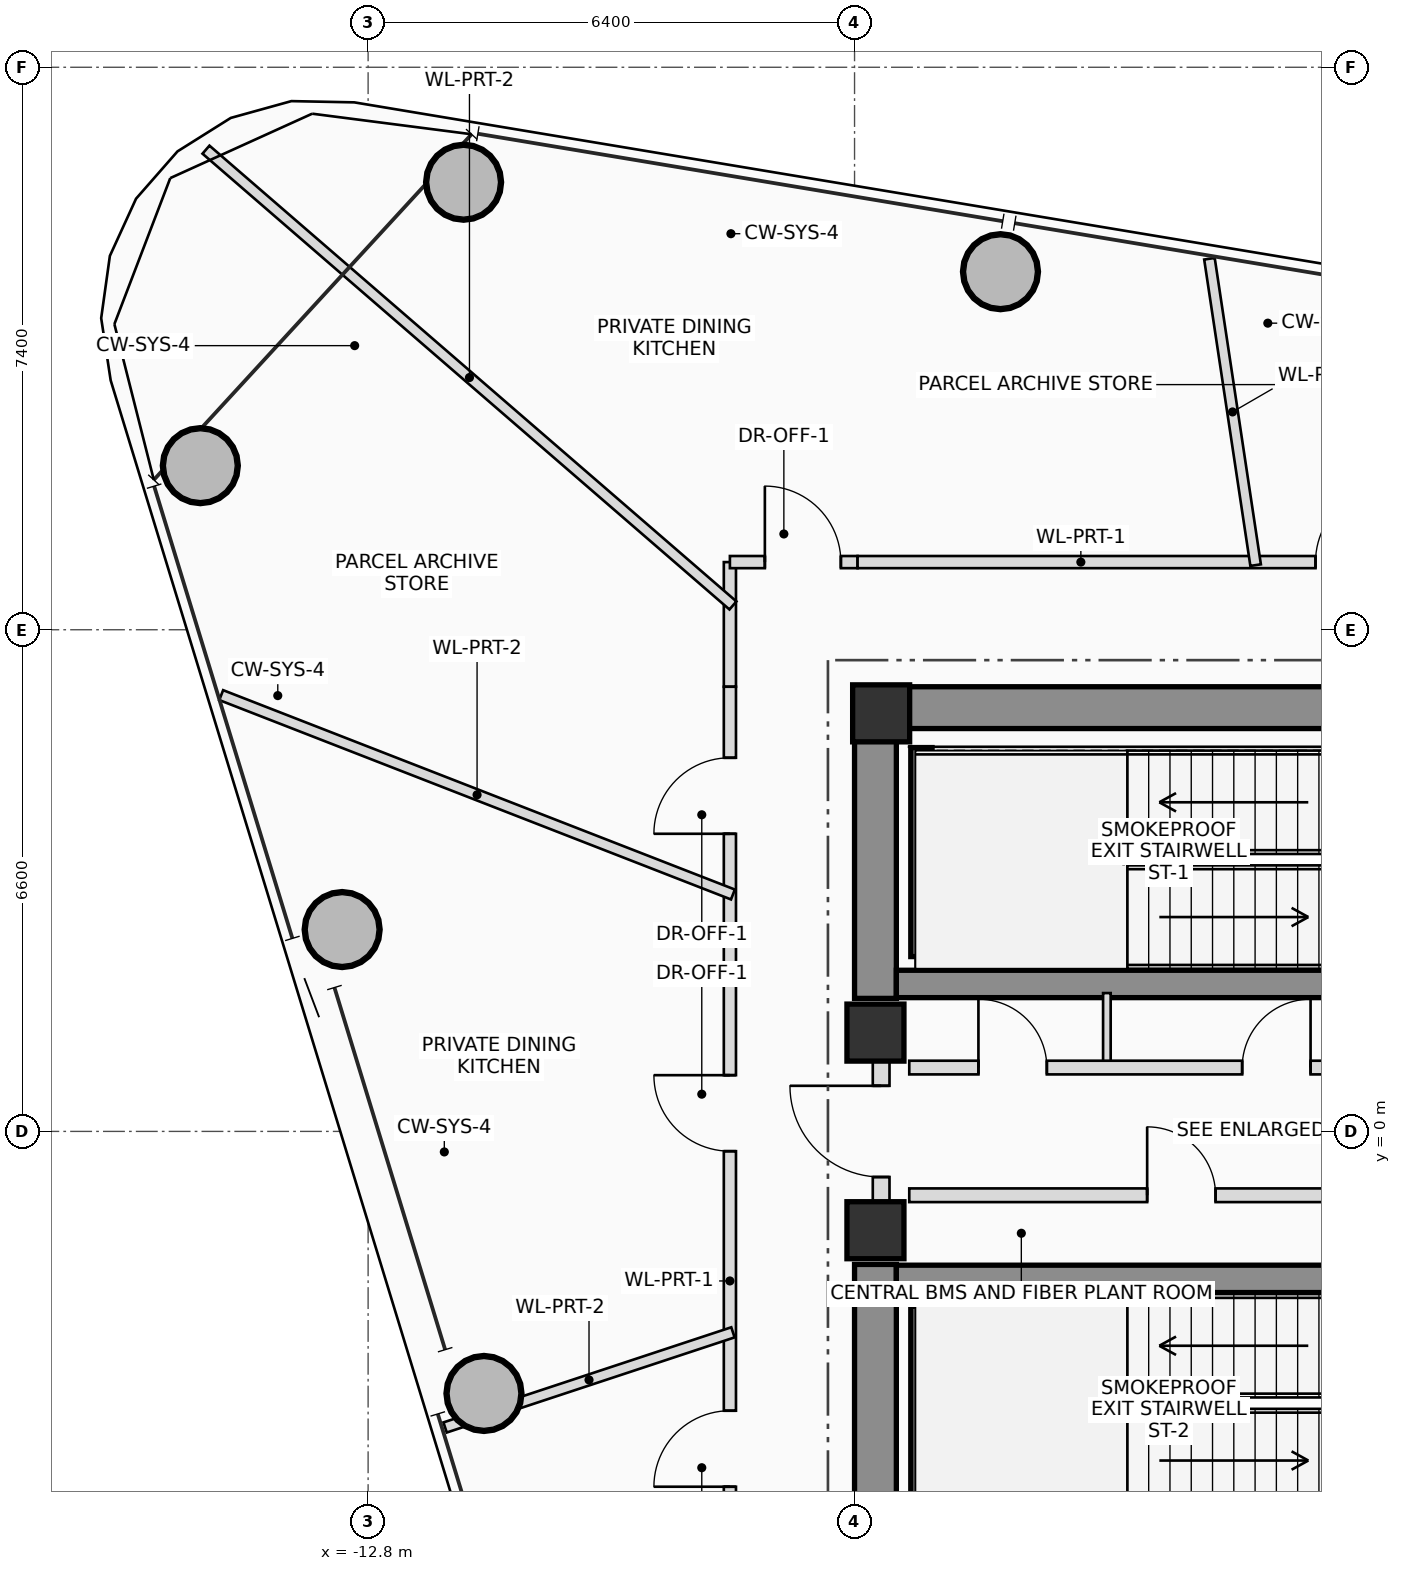
"""IFC4 building model, lengths in metres.
Left out: names, types, materials, properties, quantities, classifications, styles, units other than length and angle.
Written with IfcOpenShell. Run it as: python <this file> out.ifc"""

import sys

from ifc_helpers import new_model, si_unit, direction, frame, frame_2d, origin, origin_2d, place, context, subcontext, project, spatial, rectangle, hollow_circle, extrude, source, transform, mapped, element, fill, save


model = new_model("IFC4")
c1 = context("Model", 3, precision=1e-05, world=origin(), true_north=direction((0.0, 1.0)))
c2 = subcontext(c1, "Body", "Model", "MODEL_VIEW")
j1 = project(units=[si_unit("LENGTHUNIT", "METRE"), si_unit("PLANEANGLEUNIT", "RADIAN")], contexts=[c1])
p1 = place(None, origin())
s1 = spatial("IfcSite", under=j1, at=p1, CompositionType="ELEMENT")
p2 = place(p1, origin())
s2 = spatial("IfcBuilding", under=s1, at=p2, CompositionType="ELEMENT")
p3 = place(p2, frame((0.0, 0.0, 238.85)))
s3 = spatial("IfcBuildingStorey", under=s2, at=p3, CompositionType="ELEMENT", Elevation=238.85)
m1 = source(origin(), c2, "Body", "SweptSolid", [
    extrude(rectangle(XDim=0.75, YDim=0.75, at=origin_2d()), origin(), (0.0, 0.0, 1.0), 3.4),
])
p4 = place(p3, frame((-6.05, 5.5, 0.0), z_axis=(0.0, 0.0, 1.0), x_axis=(1.0, 0.0, 0.0)))
e1 = element("IfcColumn", 1, at=p4, inside=s3, PredefinedType="COLUMN", context=c2, shape_type="MappedRepresentation", body=[
    mapped(m1, transform((0.0, 0.0, 0.0), scale=1.0)),
])
p5 = place(p3, frame((-6.4, 5.575, 0.0), z_axis=(0.0, 0.0, 1.0), x_axis=(1.0, 0.0, 0.0)))
e2 = element("IfcWall", 2, at=p5, inside=s3, PredefinedType="SHEAR", context=c2, shape_type="SweptSolid", body=[
    extrude(rectangle(XDim=12.8, YDim=0.55, at=frame_2d((6.4, 0.0))), origin(), (0.0, 0.0, 1.0), 3.4),
])
p6 = place(p5, frame((8.6, 0.0, 0.0)))
e3 = element("IfcOpeningElement", 3, at=p6, cuts=e2, PredefinedType="OPENING", context=c2, shape_type="SweptSolid", body=[
    extrude(rectangle(XDim=1.2, YDim=2.2, at=frame_2d((0.6, 1.1))), frame((0.0, 0.285, 0.0), z_axis=(0.0, -1.0, 0.0), x_axis=(1.0, 0.0, 0.0)), (0.0, 0.0, 1.0), 0.57),
])
for number, where, z_axis, x_axis in (
    (4, (-6.125, -5.3, 0.0), (0.0, 0.0, 1.0), (0.0, 1.0, 0.0)),
    (5, (-6.125, 1.75, 0.0), (0.0, 0.0, 1.0), (0.0, 1.0, 0.0)),
):
    element("IfcWall", number, at=place(p3, frame(where, z_axis=z_axis, x_axis=x_axis)), inside=s3, PredefinedType="SHEAR", context=c2, shape_type="SweptSolid", body=[
        extrude(rectangle(XDim=3.55, YDim=0.55, at=frame_2d((1.775, 0.0))), origin(), (0.0, 0.0, 1.0), 3.4),
    ])
for number, where, z_axis, x_axis in (
    (6, (-5.85, 1.94, 0.0), (0.0, 0.0, 1.0), (1.0, 0.0, 0.0)),
    (7, (-5.85, -1.94, 0.0), (0.0, 0.0, 1.0), (1.0, 0.0, 0.0)),
):
    element("IfcWall", number, at=place(p3, frame(where, z_axis=z_axis, x_axis=x_axis)), inside=s3, PredefinedType="SHEAR", context=c2, shape_type="SweptSolid", body=[
        extrude(rectangle(XDim=11.7, YDim=0.36, at=frame_2d((5.85, 0.0))), origin(), (0.0, 0.0, 1.0), 3.4),
    ])
for number, where, z_axis, x_axis in (
    (8, (-5.52, 2.3, 0.0), (0.0, 0.0, 1.0), (0.0, 1.0, 0.0)),
    (9, (-5.52, -5.05, 0.0), (0.0, 0.0, 1.0), (0.0, 1.0, 0.0)),
):
    element("IfcWall", number, at=place(p3, frame(where, z_axis=z_axis, x_axis=x_axis)), inside=s3, PredefinedType="SHEAR", context=c2, shape_type="SweptSolid", body=[
        extrude(rectangle(XDim=2.75, YDim=0.28, at=frame_2d((1.375, 0.0))), origin(), (0.0, 0.0, 1.0), 3.4),
    ])
for number, where, z_axis, x_axis in (
    (10, (-6.125, -1.3, 0.0), (0.0, 0.0, 1.0), (1.0, 0.0, 0.0)),
    (11, (-6.125, 1.3, 0.0), (0.0, 0.0, 1.0), (1.0, 0.0, 0.0)),
):
    element("IfcColumn", number, at=place(p3, frame(where, z_axis=z_axis, x_axis=x_axis)), inside=s3, PredefinedType="COLUMN", context=c2, shape_type="MappedRepresentation", body=[
        mapped(m1, transform((0.0, 0.0, 0.0), scale=1.0)),
    ])
m2 = source(origin(), c2, "Body", "SweptSolid", [
    extrude(hollow_circle(Radius=0.5, WallThickness=0.04, at=origin_2d()), origin(), (0.0, 0.0, 1.0), 3.4),
])
for number, where, z_axis, x_axis in (
    (12, (-4.48, 11.311, 0.0), (0.0, 0.0, 1.0), (1.0, 0.0, 0.0)),
    (13, (-11.544, 12.488, 0.0), (0.0, 0.0, 1.0), (1.0, 0.0, 0.0)),
    (14, (-15.008, 8.759, 0.0), (0.0, 0.0, 1.0), (1.0, 0.0, 0.0)),
    (15, (-13.142, 2.656, 0.0), (0.0, 0.0, 1.0), (1.0, 0.0, 0.0)),
    (16, (-11.276, -3.448, 0.0), (0.0, 0.0, 1.0), (1.0, 0.0, 0.0)),
):
    element("IfcColumn", number, at=place(p3, frame(where, z_axis=z_axis, x_axis=x_axis)), inside=s3, PredefinedType="COLUMN", context=c2, shape_type="MappedRepresentation", body=[
        mapped(m2, transform((0.0, 0.0, 0.0), scale=1.0)),
    ])
p7 = place(p3, frame((-6.05, -0.95, 0.0), z_axis=(0.0, 0.0, 1.0), x_axis=(0.0, 1.0, 0.0)))
e17 = element("IfcWall", 17, at=p7, inside=s3, PredefinedType="PLUMBINGWALL", context=c2, shape_type="SweptSolid", body=[
    extrude(rectangle(XDim=1.9, YDim=0.22, at=frame_2d((0.95, 0.0))), origin(), (0.0, 0.0, 1.0), 2.18),
])
p8 = place(p7, frame((0.35, 0.0, 0.0)))
e18 = element("IfcOpeningElement", 18, at=p8, cuts=e17, PredefinedType="OPENING", context=c2, shape_type="SweptSolid", body=[
    extrude(rectangle(XDim=1.2, YDim=2.2, at=frame_2d((0.6, 1.1))), frame((0.0, 0.12, 0.0), z_axis=(0.0, -1.0, 0.0), x_axis=(1.0, 0.0, 0.0)), (0.0, 0.0, 1.0), 0.24),
])
p9 = place(p3, frame((-3.08, 0.84, 0.0), z_axis=(0.0, 0.0, 1.0), x_axis=(0.0, 1.0, 0.0)))
e19 = element("IfcWall", 19, at=p9, inside=s3, PredefinedType="PARTITIONING", context=c2, shape_type="SweptSolid", body=[
    extrude(rectangle(XDim=0.98, YDim=0.1, at=frame_2d((0.49, 0.0))), origin(), (0.0, 0.0, 1.0), 3.2),
])
p10 = place(p3, frame((-5.68, 0.84, 0.0), z_axis=(0.0, 0.0, 1.0), x_axis=(1.0, 0.0, 0.0)))
e20 = element("IfcWall", 20, at=p10, inside=s3, PredefinedType="PLUMBINGWALL", context=c2, shape_type="SweptSolid", body=[
    extrude(rectangle(XDim=10.26, YDim=0.18, at=frame_2d((5.13, 0.0))), origin(), (0.0, 0.0, 1.0), 3.2),
])
p11 = place(p10, frame((0.91, 0.0, 0.0)))
e21 = element("IfcOpeningElement", 21, at=p11, cuts=e20, PredefinedType="OPENING", context=c2, shape_type="SweptSolid", body=[
    extrude(rectangle(XDim=0.9, YDim=2.05, at=frame_2d((0.45, 1.025))), frame((0.0, 0.1, 0.0), z_axis=(0.0, -1.0, 0.0), x_axis=(1.0, 0.0, 0.0)), (0.0, 0.0, 1.0), 0.2),
])
p12 = place(p10, frame((4.38, 0.0, 0.0)))
e22 = element("IfcOpeningElement", 22, at=p12, cuts=e20, PredefinedType="OPENING", context=c2, shape_type="SweptSolid", body=[
    extrude(rectangle(XDim=0.9, YDim=2.05, at=frame_2d((0.45, 1.025))), frame((0.0, 0.1, 0.0), z_axis=(0.0, -1.0, 0.0), x_axis=(1.0, 0.0, 0.0)), (0.0, 0.0, 1.0), 0.2),
])
p13 = place(p10, frame((7.33, 0.0, 0.0)))
e23 = element("IfcOpeningElement", 23, at=p13, cuts=e20, PredefinedType="OPENING", context=c2, shape_type="SweptSolid", body=[
    extrude(rectangle(XDim=1.1, YDim=2.2, at=frame_2d((0.55, 1.1))), frame((0.0, 0.1, 0.0), z_axis=(0.0, -1.0, 0.0), x_axis=(1.0, 0.0, 0.0)), (0.0, 0.0, 1.0), 0.2),
])
p14 = place(p10, frame((8.83, 0.0, 0.0)))
e24 = element("IfcOpeningElement", 24, at=p14, cuts=e20, PredefinedType="OPENING", context=c2, shape_type="SweptSolid", body=[
    extrude(rectangle(XDim=1.1, YDim=2.2, at=frame_2d((0.55, 1.1))), frame((0.0, 0.1, 0.0), z_axis=(0.0, -1.0, 0.0), x_axis=(1.0, 0.0, 0.0)), (0.0, 0.0, 1.0), 0.2),
])
p15 = place(p3, frame((-5.68, -0.84, 0.0), z_axis=(0.0, 0.0, 1.0), x_axis=(1.0, 0.0, 0.0)))
e25 = element("IfcWall", 25, at=p15, inside=s3, PredefinedType="PLUMBINGWALL", context=c2, shape_type="SweptSolid", body=[
    extrude(rectangle(XDim=8.7, YDim=0.18, at=frame_2d((4.35, 0.0))), origin(), (0.0, 0.0, 1.0), 3.2),
])
p16 = place(p15, frame((3.13, 0.0, 0.0)))
e26 = element("IfcOpeningElement", 26, at=p16, cuts=e25, PredefinedType="OPENING", context=c2, shape_type="SweptSolid", body=[
    extrude(rectangle(XDim=0.9, YDim=2.05, at=frame_2d((0.45, 1.025))), frame((0.0, 0.1, 0.0), z_axis=(0.0, -1.0, 0.0), x_axis=(1.0, 0.0, 0.0)), (0.0, 0.0, 1.0), 0.2),
])
p17 = place(p15, frame((7.33, 0.0, 0.0)))
e27 = element("IfcOpeningElement", 27, at=p17, cuts=e25, PredefinedType="OPENING", context=c2, shape_type="SweptSolid", body=[
    extrude(rectangle(XDim=1.1, YDim=2.2, at=frame_2d((0.55, 1.1))), frame((0.0, 0.1, 0.0), z_axis=(0.0, -1.0, 0.0), x_axis=(1.0, 0.0, 0.0)), (0.0, 0.0, 1.0), 0.2),
])
p18 = place(p3, frame((-8.04, 5.85, 0.0), z_axis=(0.0, 0.0, 1.0), x_axis=(0.0, 1.0, 0.0)))
e28 = element("IfcWall", 28, at=p18, inside=s3, PredefinedType="PARTITIONING", context=c2, shape_type="SweptSolid", body=[
    extrude(rectangle(XDim=1.64, YDim=0.16, at=frame_2d((0.82, 0.0))), origin(), (0.0, 0.0, 1.0), 2.605),
])
p19 = place(p3, frame((-8.04, 7.49, 0.0), z_axis=(0.0, 0.0, 1.0), x_axis=(1.0, 0.0, 0.0)))
e29 = element("IfcWall", 29, at=p19, inside=s3, PredefinedType="PARTITIONING", context=c2, shape_type="SweptSolid", body=[
    extrude(rectangle(XDim=1.68, YDim=0.16, at=frame_2d((0.84, 0.0))), origin(), (0.0, 0.0, 1.0), 2.605),
])
p20 = place(p19, frame((0.46, 0.0, 0.0)))
e30 = element("IfcOpeningElement", 30, at=p20, cuts=e29, PredefinedType="OPENING", context=c2, shape_type="SweptSolid", body=[
    extrude(rectangle(XDim=1.0, YDim=2.25, at=frame_2d((0.5, 1.125))), frame((0.0, 0.09, 0.0), z_axis=(0.0, -1.0, 0.0), x_axis=(1.0, 0.0, 0.0)), (0.0, 0.0, 1.0), 0.18),
])
p21 = place(p3, frame((-6.36, 7.49, 0.0), z_axis=(0.0, 0.0, 1.0), x_axis=(1.0, 0.0, 0.0)))
e31 = element("IfcWall", 31, at=p21, inside=s3, PredefinedType="PARTITIONING", context=c2, shape_type="SweptSolid", body=[
    extrude(rectangle(XDim=9.81, YDim=0.16, at=frame_2d((4.905, 0.0))), origin(), (0.0, 0.0, 1.0), 2.605),
])
p22 = place(p21, frame((6.025, 0.0, 0.0)))
e32 = element("IfcOpeningElement", 32, at=p22, cuts=e31, PredefinedType="OPENING", context=c2, shape_type="SweptSolid", body=[
    extrude(rectangle(XDim=1.0, YDim=2.25, at=frame_2d((0.5, 1.125))), frame((0.0, 0.09, 0.0), z_axis=(0.0, -1.0, 0.0), x_axis=(1.0, 0.0, 0.0)), (0.0, 0.0, 1.0), 0.18),
])
p23 = place(p21, frame((8.487, 0.0, 0.0)))
e33 = element("IfcOpeningElement", 33, at=p23, cuts=e31, PredefinedType="OPENING", context=c2, shape_type="SweptSolid", body=[
    extrude(rectangle(XDim=1.0, YDim=2.25, at=frame_2d((0.5, 1.125))), frame((0.0, 0.09, 0.0), z_axis=(0.0, -1.0, 0.0), x_axis=(1.0, 0.0, 0.0)), (0.0, 0.0, 1.0), 0.18),
])
p24 = place(p3, frame((-8.04, -5.85, 0.0), z_axis=(0.0, 0.0, 1.0), x_axis=(0.0, 1.0, 0.0)))
e34 = element("IfcWall", 34, at=p24, inside=s3, PredefinedType="PARTITIONING", context=c2, shape_type="SweptSolid", body=[
    extrude(rectangle(XDim=11.7, YDim=0.16, at=frame_2d((5.85, 0.0))), origin(), (0.0, 0.0, 1.0), 2.605),
])
p25 = place(p24, frame((1.175, 0.0, 0.0)))
e35 = element("IfcOpeningElement", 35, at=p25, cuts=e34, PredefinedType="OPENING", context=c2, shape_type="SweptSolid", body=[
    extrude(rectangle(XDim=1.0, YDim=2.25, at=frame_2d((0.5, 1.125))), frame((0.0, 0.09, 0.0), z_axis=(0.0, -1.0, 0.0), x_axis=(1.0, 0.0, 0.0)), (0.0, 0.0, 1.0), 0.18),
])
p26 = place(p24, frame((5.59, 0.0, 0.0)))
e36 = element("IfcOpeningElement", 36, at=p26, cuts=e34, PredefinedType="OPENING", context=c2, shape_type="SweptSolid", body=[
    extrude(rectangle(XDim=1.0, YDim=2.25, at=frame_2d((0.5, 1.125))), frame((0.0, 0.09, 0.0), z_axis=(0.0, -1.0, 0.0), x_axis=(1.0, 0.0, 0.0)), (0.0, 0.0, 1.0), 0.18),
])
p27 = place(p24, frame((9.766, 0.0, 0.0)))
e37 = element("IfcOpeningElement", 37, at=p27, cuts=e34, PredefinedType="OPENING", context=c2, shape_type="SweptSolid", body=[
    extrude(rectangle(XDim=1.0, YDim=2.25, at=frame_2d((0.5, 1.125))), frame((0.0, 0.09, 0.0), z_axis=(0.0, -1.0, 0.0), x_axis=(1.0, 0.0, 0.0)), (0.0, 0.0, 1.0), 0.18),
])
p28 = place(p3, frame((-1.123, 7.45, 0.0), z_axis=(0.0, 0.0, 1.0), x_axis=(-0.149063767164, 0.988827585234, 0.0)))
e38 = element("IfcWall", 38, at=p28, inside=s3, PredefinedType="PARTITIONING", context=c2, shape_type="SweptSolid", body=[
    extrude(rectangle(XDim=4.077, YDim=0.14, at=frame_2d((2.038, 0.0))), origin(), (0.0, 0.0, 1.0), 2.765),
])
p29 = place(p3, frame((-8.0, 6.919, 0.0), z_axis=(0.0, 0.0, 1.0), x_axis=(-0.756353912554, 0.654162639535, 0.0)))
e39 = element("IfcWall", 39, at=p29, inside=s3, PredefinedType="PARTITIONING", context=c2, shape_type="SweptSolid", body=[
    extrude(rectangle(XDim=9.167, YDim=0.14, at=frame_2d((4.583, 0.0))), origin(), (0.0, 0.0, 1.0), 2.765),
])
p30 = place(p3, frame((-8.0, 3.117, 0.0), z_axis=(0.0, 0.0, 1.0), x_axis=(-0.931773681271, 0.363039676744, 0.0)))
e40 = element("IfcWall", 40, at=p30, inside=s3, PredefinedType="PARTITIONING", context=c2, shape_type="SweptSolid", body=[
    extrude(rectangle(XDim=7.226, YDim=0.14, at=frame_2d((3.613, 0.0))), origin(), (0.0, 0.0, 1.0), 2.605),
])
p31 = place(p3, frame((-8.0, -2.644, 0.0), z_axis=(0.0, 0.0, 1.0), x_axis=(-0.949500330173, -0.313766032263, 0.0)))
e41 = element("IfcWall", 41, at=p31, inside=s3, PredefinedType="PARTITIONING", context=c2, shape_type="SweptSolid", body=[
    extrude(rectangle(XDim=3.989, YDim=0.14, at=frame_2d((1.994, 0.0))), origin(), (0.0, 0.0, 1.0), 2.605),
])
p32 = place(p8, origin())
e42 = element("IfcDoor", 42, at=p32, inside=s3, OperationType="SINGLE_SWING_RIGHT", PredefinedType="DOOR", context=c2, shape_type="SweptSolid", body=[
    extrude(rectangle(XDim=1.2, YDim=2.2, at=frame_2d((0.6, 1.1))), frame((0.0, 0.025, 0.0), z_axis=(0.0, -1.0, 0.0), x_axis=(1.0, 0.0, 0.0)), (0.0, 0.0, 1.0), 0.05),
])
fill(e18, e42)
p33 = place(p11, origin())
e43 = element("IfcDoor", 43, at=p33, inside=s3, OperationType="SINGLE_SWING_LEFT", PredefinedType="DOOR", context=c2, shape_type="SweptSolid", body=[
    extrude(rectangle(XDim=0.9, YDim=2.05, at=frame_2d((0.45, 1.025))), frame((0.0, 0.025, 0.0), z_axis=(0.0, -1.0, 0.0), x_axis=(1.0, 0.0, 0.0)), (0.0, 0.0, 1.0), 0.05),
])
fill(e21, e43)
p34 = place(p12, origin())
e44 = element("IfcDoor", 44, at=p34, inside=s3, OperationType="SINGLE_SWING_RIGHT", PredefinedType="DOOR", context=c2, shape_type="SweptSolid", body=[
    extrude(rectangle(XDim=0.9, YDim=2.05, at=frame_2d((0.45, 1.025))), frame((0.0, 0.025, 0.0), z_axis=(0.0, -1.0, 0.0), x_axis=(1.0, 0.0, 0.0)), (0.0, 0.0, 1.0), 0.05),
])
fill(e22, e44)
p35 = place(p16, origin())
e45 = element("IfcDoor", 45, at=p35, inside=s3, OperationType="SINGLE_SWING_LEFT", PredefinedType="DOOR", context=c2, shape_type="SweptSolid", body=[
    extrude(rectangle(XDim=0.9, YDim=2.05, at=frame_2d((0.45, 1.025))), frame((0.0, 0.025, 0.0), z_axis=(0.0, -1.0, 0.0), x_axis=(1.0, 0.0, 0.0)), (0.0, 0.0, 1.0), 0.05),
])
fill(e26, e45)
p36 = place(p20, origin())
e46 = element("IfcDoor", 46, at=p36, inside=s3, OperationType="SINGLE_SWING_LEFT", PredefinedType="DOOR", context=c2, shape_type="SweptSolid", body=[
    extrude(rectangle(XDim=1.0, YDim=2.25, at=frame_2d((0.5, 1.125))), frame((0.0, 0.025, 0.0), z_axis=(0.0, -1.0, 0.0), x_axis=(1.0, 0.0, 0.0)), (0.0, 0.0, 1.0), 0.05),
])
fill(e30, e46)
p37 = place(p22, origin())
e47 = element("IfcDoor", 47, at=p37, inside=s3, OperationType="SINGLE_SWING_RIGHT", PredefinedType="DOOR", context=c2, shape_type="SweptSolid", body=[
    extrude(rectangle(XDim=1.0, YDim=2.25, at=frame_2d((0.5, 1.125))), frame((0.0, 0.025, 0.0), z_axis=(0.0, -1.0, 0.0), x_axis=(1.0, 0.0, 0.0)), (0.0, 0.0, 1.0), 0.05),
])
fill(e32, e47)
p38 = place(p25, origin())
e48 = element("IfcDoor", 48, at=p38, inside=s3, OperationType="SINGLE_SWING_LEFT", PredefinedType="DOOR", context=c2, shape_type="SweptSolid", body=[
    extrude(rectangle(XDim=1.0, YDim=2.25, at=frame_2d((0.5, 1.125))), frame((0.0, 0.025, 0.0), z_axis=(0.0, -1.0, 0.0), x_axis=(1.0, 0.0, 0.0)), (0.0, 0.0, 1.0), 0.05),
])
fill(e35, e48)
p39 = place(p26, origin())
e49 = element("IfcDoor", 49, at=p39, inside=s3, OperationType="SINGLE_SWING_RIGHT", PredefinedType="DOOR", context=c2, shape_type="SweptSolid", body=[
    extrude(rectangle(XDim=1.0, YDim=2.25, at=frame_2d((0.5, 1.125))), frame((0.0, 0.025, 0.0), z_axis=(0.0, -1.0, 0.0), x_axis=(1.0, 0.0, 0.0)), (0.0, 0.0, 1.0), 0.05),
])
fill(e36, e49)
p40 = place(p27, origin())
e50 = element("IfcDoor", 50, at=p40, inside=s3, OperationType="SINGLE_SWING_LEFT", PredefinedType="DOOR", context=c2, shape_type="SweptSolid", body=[
    extrude(rectangle(XDim=1.0, YDim=2.25, at=frame_2d((0.5, 1.125))), frame((0.0, 0.025, 0.0), z_axis=(0.0, -1.0, 0.0), x_axis=(1.0, 0.0, 0.0)), (0.0, 0.0, 1.0), 0.05),
])
fill(e37, e50)
save(model, sys.argv[1])
